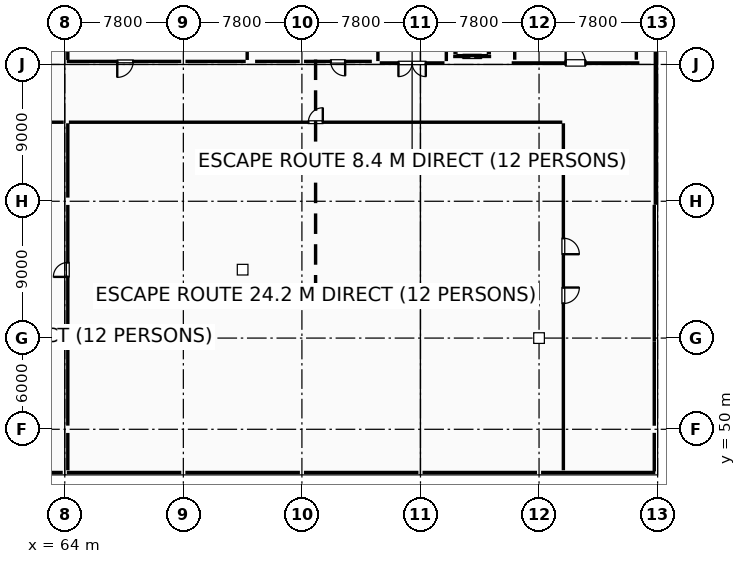
"""IFC4 building model, lengths in metres.
Left out: names, types, materials, properties, quantities, classifications, styles, units other than length and angle.
Written with IfcOpenShell. Run it as: python <this file> out.ifc"""

import sys

from ifc_helpers import new_model, si_unit, direction, frame, frame_2d, origin, origin_2d, place, context, subcontext, project, spatial, rectangle, hollow_rectangle, i_section, extrude, element, fill, save


model = new_model("IFC4")
c1 = context("Model", 3, precision=1e-05, world=origin(), true_north=direction((0.0, 1.0)))
c2 = subcontext(c1, "Body", "Model", "MODEL_VIEW")
j1 = project(units=[si_unit("LENGTHUNIT", "METRE"), si_unit("PLANEANGLEUNIT", "RADIAN")], contexts=[c1])
p1 = place(None, origin())
s1 = spatial("IfcSite", under=j1, at=p1, CompositionType="ELEMENT")
p2 = place(p1, origin())
s2 = spatial("IfcBuilding", under=s1, at=p2, CompositionType="ELEMENT")
p3 = place(p2, frame((0.0, 0.0, 24.3)))
s3 = spatial("IfcBuildingStorey", under=s2, at=p3, CompositionType="ELEMENT", Elevation=24.3)
p4 = place(p3, frame((64.0, 50.0, 0.0), z_axis=(0.0, 0.0, 1.0), x_axis=(1.0, 0.0, 0.0)))
e1 = element("IfcColumn", 1, at=p4, inside=s3, PredefinedType="COLUMN", context=c2, shape_type="SweptSolid", body=[
    extrude(hollow_rectangle(XDim=0.45, YDim=0.45, WallThickness=0.02, at=origin_2d()), origin(), (0.0, 0.0, 1.0), 4.5),
])
for number, where, z_axis, x_axis in (
    (2, (64.0, 56.0, 0.0), (0.0, 0.0, 1.0), (1.0, 0.0, 0.0)),
    (3, (64.0, 65.0, 0.0), (0.0, 0.0, 1.0), (1.0, 0.0, 0.0)),
    (4, (64.0, 74.0, 0.0), (0.0, 0.0, 1.0), (1.0, 0.0, 0.0)),
    (5, (71.8, 74.0, 0.0), (0.0, 0.0, 1.0), (1.0, 0.0, 0.0)),
    (6, (79.6, 74.0, 0.0), (0.0, 0.0, 1.0), (1.0, 0.0, 0.0)),
):
    element("IfcColumn", number, at=place(p3, frame(where, z_axis=z_axis, x_axis=x_axis)), inside=s3, PredefinedType="COLUMN", context=c2, shape_type="SweptSolid", body=[
        extrude(i_section(OverallWidth=0.25, OverallDepth=0.45, WebThickness=0.011, FlangeThickness=0.014, FilletRadius=0.015, at=origin_2d()), origin(), (0.0, 0.0, 1.0), 4.5),
    ])
p5 = place(p3, frame((103.0, 50.0, 0.0), z_axis=(0.0, 0.0, 1.0), x_axis=(1.0, 0.0, 0.0)))
e7 = element("IfcColumn", 7, at=p5, inside=s3, PredefinedType="COLUMN", context=c2, shape_type="SweptSolid", body=[
    extrude(hollow_rectangle(XDim=0.45, YDim=0.45, WallThickness=0.02, at=origin_2d()), origin(), (0.0, 0.0, 1.0), 4.5),
])
for number, where, z_axis, x_axis in (
    (8, (103.0, 56.0, 0.0), (0.0, 0.0, 1.0), (1.0, 0.0, 0.0)),
    (9, (103.0, 65.0, 0.0), (0.0, 0.0, 1.0), (1.0, 0.0, 0.0)),
    (10, (103.0, 74.0, 0.0), (0.0, 0.0, 1.0), (1.0, 0.0, 0.0)),
    (11, (64.0, 47.0, 0.0), (0.0, 0.0, 1.0), (1.0, 0.0, 0.0)),
    (12, (71.8, 47.0, 0.0), (0.0, 0.0, 1.0), (1.0, 0.0, 0.0)),
    (13, (79.6, 47.0, 0.0), (0.0, 0.0, 1.0), (1.0, 0.0, 0.0)),
    (14, (87.4, 47.0, 0.0), (0.0, 0.0, 1.0), (1.0, 0.0, 0.0)),
    (15, (95.2, 47.0, 0.0), (0.0, 0.0, 1.0), (1.0, 0.0, 0.0)),
    (16, (103.0, 47.0, 0.0), (0.0, 0.0, 1.0), (1.0, 0.0, 0.0)),
):
    element("IfcColumn", number, at=place(p3, frame(where, z_axis=z_axis, x_axis=x_axis)), inside=s3, PredefinedType="COLUMN", context=c2, shape_type="SweptSolid", body=[
        extrude(i_section(OverallWidth=0.25, OverallDepth=0.45, WebThickness=0.011, FlangeThickness=0.014, FilletRadius=0.015, at=origin_2d()), origin(), (0.0, 0.0, 1.0), 4.5),
    ])
for number, where, z_axis, x_axis in (
    (17, (102.85, 82.767, 0.0), (0.0, 0.0, 1.0), (0.0, -1.0, 0.0)),
    (18, (102.85, 73.767, 0.0), (0.0, 0.0, 1.0), (0.0, -1.0, 0.0)),
):
    element("IfcWall", number, at=place(p3, frame(where, z_axis=z_axis, x_axis=x_axis)), inside=s3, PredefinedType="ELEMENTEDWALL", context=c2, shape_type="SweptSolid", body=[
        extrude(rectangle(XDim=9.0, YDim=0.26, at=frame_2d((4.5, 0.0))), origin(), (0.0, 0.0, 1.0), 4.5),
    ])
p6 = place(p3, frame((102.78, 64.767, 0.0), z_axis=(0.0, 0.0, 1.0), x_axis=(0.0, -1.0, 0.0)))
e19 = element("IfcWall", 19, at=p6, inside=s3, PredefinedType="STANDARD", context=c2, shape_type="SweptSolid", body=[
    extrude(rectangle(XDim=9.0, YDim=0.4, at=frame_2d((4.5, 0.0))), origin(), (0.0, 0.0, 1.0), 4.5),
])
p7 = place(p3, frame((102.78, 55.767, 0.0), z_axis=(0.0, 0.0, 1.0), x_axis=(0.0, -1.0, 0.0)))
e20 = element("IfcWall", 20, at=p7, inside=s3, PredefinedType="STANDARD", context=c2, shape_type="SweptSolid", body=[
    extrude(rectangle(XDim=5.534, YDim=0.4, at=frame_2d((2.767, 0.0))), origin(), (0.0, 0.0, 1.0), 4.5),
])
p8 = place(p3, frame((102.78, 49.767, 0.0), z_axis=(0.0, 0.0, 1.0), x_axis=(0.0, -1.0, 0.0)))
e21 = element("IfcWall", 21, at=p8, inside=s3, PredefinedType="STANDARD", context=c2, shape_type="SweptSolid", body=[
    extrude(rectangle(XDim=2.534, YDim=0.4, at=frame_2d((1.267, 0.0))), origin(), (0.0, 0.0, 1.0), 4.5),
])
p9 = place(p3, frame((102.85, 47.16, 0.0), z_axis=(0.0, 0.0, 1.0), x_axis=(-1.0, 0.0, 0.0)))
e22 = element("IfcWall", 22, at=p9, inside=s3, PredefinedType="STANDARD", context=c2, shape_type="SweptSolid", body=[
    extrude(rectangle(XDim=7.517, YDim=0.28, at=frame_2d((3.759, 0.0))), origin(), (0.0, 0.0, 1.0), 1.893),
])
p10 = place(p3, frame((95.067, 47.16, 0.0), z_axis=(0.0, 0.0, 1.0), x_axis=(-1.0, 0.0, 0.0)))
e23 = element("IfcWall", 23, at=p10, inside=s3, PredefinedType="STANDARD", context=c2, shape_type="SweptSolid", body=[
    extrude(rectangle(XDim=7.534, YDim=0.28, at=frame_2d((3.767, 0.0))), origin(), (0.0, 0.0, 1.0), 3.088),
])
p11 = place(p3, frame((87.267, 47.16, 0.0), z_axis=(0.0, 0.0, 1.0), x_axis=(-1.0, 0.0, 0.0)))
e24 = element("IfcWall", 24, at=p11, inside=s3, PredefinedType="STANDARD", context=c2, shape_type="SweptSolid", body=[
    extrude(rectangle(XDim=7.534, YDim=0.28, at=frame_2d((3.767, 0.0))), origin(), (0.0, 0.0, 1.0), 1.893),
])
for number, where, z_axis, x_axis in (
    (25, (79.467, 47.16, 0.0), (0.0, 0.0, 1.0), (-1.0, 0.0, 0.0)),
    (26, (71.667, 47.16, 0.0), (0.0, 0.0, 1.0), (-1.0, 0.0, 0.0)),
):
    element("IfcWall", number, at=place(p3, frame(where, z_axis=z_axis, x_axis=x_axis)), inside=s3, PredefinedType="STANDARD", context=c2, shape_type="SweptSolid", body=[
        extrude(rectangle(XDim=7.534, YDim=0.28, at=frame_2d((3.767, 0.0))), origin(), (0.0, 0.0, 1.0), 1.25),
    ])
p12 = place(p3, frame((63.867, 47.16, 0.0), z_axis=(0.0, 0.0, 1.0), x_axis=(-1.0, 0.0, 0.0)))
e27 = element("IfcWall", 27, at=p12, inside=s3, PredefinedType="STANDARD", context=c2, shape_type="SweptSolid", body=[
    extrude(rectangle(XDim=9.717, YDim=0.28, at=frame_2d((4.858, 0.0))), origin(), (0.0, 0.0, 1.0), 4.28),
])
p13 = place(p3, frame((93.4, 74.1, 0.0), z_axis=(0.0, 0.0, 1.0), x_axis=(1.0, 0.0, 0.0)))
e28 = element("IfcWall", 28, at=p13, inside=s3, PredefinedType="SHEAR", context=c2, shape_type="SweptSolid", body=[
    extrude(rectangle(XDim=8.4, YDim=0.4, at=frame_2d((4.2, 0.0))), origin(), (0.0, 0.0, 1.0), 4.28),
])
p14 = place(p13, frame((3.55, 0.0, 0.0)))
e29 = element("IfcOpeningElement", 29, at=p14, cuts=e28, PredefinedType="OPENING", context=c2, shape_type="SweptSolid", body=[
    extrude(rectangle(XDim=1.3, YDim=2.15, at=frame_2d((0.65, 1.075))), frame((0.0, 0.21, 0.0), z_axis=(0.0, -1.0, 0.0), x_axis=(1.0, 0.0, 0.0)), (0.0, 0.0, 1.0), 0.42),
])
for number, where, z_axis, x_axis in (
    (30, (101.6, 74.31, 0.0), (0.0, 0.0, 1.0), (0.0, 1.0, 0.0)),
    (31, (93.6, 82.69, 0.0), (0.0, 0.0, 1.0), (0.0, -1.0, 0.0)),
):
    element("IfcWall", number, at=place(p3, frame(where, z_axis=z_axis, x_axis=x_axis)), inside=s3, PredefinedType="SHEAR", context=c2, shape_type="SweptSolid", body=[
        extrude(rectangle(XDim=8.38, YDim=0.4, at=frame_2d((4.19, 0.0))), origin(), (0.0, 0.0, 1.0), 4.28),
    ])
p15 = place(p3, frame((89.55, 74.525, 0.0), z_axis=(0.0, 0.0, 1.0), x_axis=(1.0, 0.0, 0.0)))
e32 = element("IfcWall", 32, at=p15, inside=s3, PredefinedType="STANDARD", context=c2, shape_type="SweptSolid", body=[
    extrude(rectangle(XDim=2.5, YDim=0.25, at=frame_2d((1.25, 0.0))), origin(), (0.0, 0.0, 1.0), 4.27),
])
p16 = place(p15, frame((0.65, 0.0, 0.0)))
e33 = element("IfcOpeningElement", 33, at=p16, cuts=e32, PredefinedType="OPENING", context=c2, shape_type="SweptSolid", body=[
    extrude(rectangle(XDim=1.2, YDim=2.05, at=frame_2d((0.6, 1.025))), frame((0.0, 0.135, 0.0), z_axis=(0.0, -1.0, 0.0), x_axis=(1.0, 0.0, 0.0)), (0.0, 0.0, 1.0), 0.27),
])
for number, where, z_axis, x_axis in (
    (34, (91.925, 74.66, 0.0), (0.0, 0.0, 1.0), (0.0, 1.0, 0.0)),
    (35, (89.675, 76.94, 0.0), (0.0, 0.0, 1.0), (0.0, -1.0, 0.0)),
):
    element("IfcWall", number, at=place(p3, frame(where, z_axis=z_axis, x_axis=x_axis)), inside=s3, PredefinedType="STANDARD", context=c2, shape_type="SweptSolid", body=[
        extrude(rectangle(XDim=2.28, YDim=0.25, at=frame_2d((1.14, 0.0))), origin(), (0.0, 0.0, 1.0), 4.27),
    ])
for number, where, z_axis, x_axis in (
    (36, (84.6, 74.22, 0.0), (0.0, 0.0, 1.0), (0.0, 1.0, 0.0)),
    (37, (89.1, 77.58, 0.0), (0.0, 0.0, 1.0), (0.0, -1.0, 0.0)),
):
    element("IfcWall", number, at=place(p3, frame(where, z_axis=z_axis, x_axis=x_axis)), inside=s3, PredefinedType="PARTITIONING", context=c2, shape_type="SweptSolid", body=[
        extrude(rectangle(XDim=3.36, YDim=0.2, at=frame_2d((1.68, 0.0))), origin(), (0.0, 0.0, 1.0), 4.5),
    ])
p17 = place(p3, frame((88.98, 74.1, 0.0), z_axis=(0.0, 0.0, 1.0), x_axis=(-1.0, 0.0, 0.0)))
e38 = element("IfcWall", 38, at=p17, inside=s3, PredefinedType="PARTITIONING", context=c2, shape_type="SweptSolid", body=[
    extrude(rectangle(XDim=4.26, YDim=0.2, at=frame_2d((2.13, 0.0))), origin(), (0.0, 0.0, 1.0), 4.5),
])
p18 = place(p17, frame((1.23, 0.0, 0.0)))
e39 = element("IfcOpeningElement", 39, at=p18, cuts=e38, PredefinedType="OPENING", context=c2, shape_type="SweptSolid", body=[
    extrude(rectangle(XDim=1.8, YDim=2.15, at=frame_2d((0.9, 1.075))), frame((0.0, 0.11, 0.0), z_axis=(0.0, -1.0, 0.0), x_axis=(1.0, 0.0, 0.0)), (0.0, 0.0, 1.0), 0.22),
])
p19 = place(p3, frame((64.27, 70.2, 0.0), z_axis=(0.0, 0.0, 1.0), x_axis=(1.0, 0.0, 0.0)))
e40 = element("IfcWall", 40, at=p19, inside=s3, PredefinedType="PARTITIONING", context=c2, shape_type="SweptSolid", body=[
    extrude(rectangle(XDim=32.46, YDim=0.1, at=frame_2d((16.23, 0.0))), origin(), (0.0, 0.0, 1.0), 4.5),
])
p20 = place(p19, frame((15.755, 0.0, 0.0)))
e41 = element("IfcOpeningElement", 41, at=p20, cuts=e40, PredefinedType="OPENING", context=c2, shape_type="SweptSolid", body=[
    extrude(rectangle(XDim=0.95, YDim=2.15, at=frame_2d((0.475, 1.075))), frame((0.0, 0.06, 0.0), z_axis=(0.0, -1.0, 0.0), x_axis=(1.0, 0.0, 0.0)), (0.0, 0.0, 1.0), 0.12),
])
p21 = place(p3, frame((96.8, 70.13, 0.0), z_axis=(0.0, 0.0, 1.0), x_axis=(0.0, -1.0, 0.0)))
e42 = element("IfcWall", 42, at=p21, inside=s3, PredefinedType="PARTITIONING", context=c2, shape_type="SweptSolid", body=[
    extrude(rectangle(XDim=22.826, YDim=0.1, at=frame_2d((11.413, 0.0))), origin(), (0.0, 0.0, 1.0), 4.5),
])
p22 = place(p21, frame((10.805, 0.0, 0.0)))
e43 = element("IfcOpeningElement", 43, at=p22, cuts=e42, PredefinedType="OPENING", context=c2, shape_type="SweptSolid", body=[
    extrude(rectangle(XDim=1.05, YDim=2.15, at=frame_2d((0.525, 1.075))), frame((0.0, 0.06, 0.0), z_axis=(0.0, -1.0, 0.0), x_axis=(1.0, 0.0, 0.0)), (0.0, 0.0, 1.0), 0.12),
])
p23 = place(p21, frame((7.563, 0.0, 0.0)))
e44 = element("IfcOpeningElement", 44, at=p23, cuts=e42, PredefinedType="OPENING", context=c2, shape_type="SweptSolid", body=[
    extrude(rectangle(XDim=1.05, YDim=2.15, at=frame_2d((0.525, 1.075))), frame((0.0, 0.06, 0.0), z_axis=(0.0, -1.0, 0.0), x_axis=(1.0, 0.0, 0.0)), (0.0, 0.0, 1.0), 0.12),
])
p24 = place(p3, frame((64.2, 47.304, 0.0), z_axis=(0.0, 0.0, 1.0), x_axis=(0.0, 1.0, 0.0)))
e45 = element("IfcWall", 45, at=p24, inside=s3, PredefinedType="PARTITIONING", context=c2, shape_type="SweptSolid", body=[
    extrude(rectangle(XDim=2.456, YDim=0.1, at=frame_2d((1.228, 0.0))), origin(), (0.0, 0.0, 1.0), 3.51),
])
p25 = place(p3, frame((64.2, 50.24, 0.0), z_axis=(0.0, 0.0, 1.0), x_axis=(0.0, 1.0, 0.0)))
e46 = element("IfcWall", 46, at=p25, inside=s3, PredefinedType="PARTITIONING", context=c2, shape_type="SweptSolid", body=[
    extrude(rectangle(XDim=5.52, YDim=0.1, at=frame_2d((2.76, 0.0))), origin(), (0.0, 0.0, 1.0), 3.61),
])
p26 = place(p3, frame((64.2, 56.24, 0.0), z_axis=(0.0, 0.0, 1.0), x_axis=(0.0, 1.0, 0.0)))
e47 = element("IfcWall", 47, at=p26, inside=s3, PredefinedType="PARTITIONING", context=c2, shape_type="SweptSolid", body=[
    extrude(rectangle(XDim=8.52, YDim=0.1, at=frame_2d((4.26, 0.0))), origin(), (0.0, 0.0, 1.0), 3.81),
])
p27 = place(p26, frame((3.785, 0.0, 0.0)))
e48 = element("IfcOpeningElement", 48, at=p27, cuts=e47, PredefinedType="OPENING", context=c2, shape_type="SweptSolid", body=[
    extrude(rectangle(XDim=0.95, YDim=2.15, at=frame_2d((0.475, 1.075))), frame((0.0, 0.06, 0.0), z_axis=(0.0, -1.0, 0.0), x_axis=(1.0, 0.0, 0.0)), (0.0, 0.0, 1.0), 0.12),
])
p28 = place(p3, frame((64.2, 65.24, 0.0), z_axis=(0.0, 0.0, 1.0), x_axis=(0.0, 1.0, 0.0)))
e49 = element("IfcWall", 49, at=p28, inside=s3, PredefinedType="PARTITIONING", context=c2, shape_type="SweptSolid", body=[
    extrude(rectangle(XDim=4.89, YDim=0.1, at=frame_2d((2.445, 0.0))), origin(), (0.0, 0.0, 1.0), 3.66),
])
p29 = place(p3, frame((54.47, 70.2, 0.0), z_axis=(0.0, 0.0, 1.0), x_axis=(1.0, 0.0, 0.0)))
e50 = element("IfcWall", 50, at=p29, inside=s3, PredefinedType="PARTITIONING", context=c2, shape_type="SweptSolid", body=[
    extrude(rectangle(XDim=9.46, YDim=0.1, at=frame_2d((4.73, 0.0))), origin(), (0.0, 0.0, 1.0), 4.27),
])
p30 = place(p29, frame((4.205, 0.0, 0.0)))
e51 = element("IfcOpeningElement", 51, at=p30, cuts=e50, PredefinedType="OPENING", context=c2, shape_type="SweptSolid", body=[
    extrude(rectangle(XDim=1.05, YDim=2.15, at=frame_2d((0.525, 1.075))), frame((0.0, 0.06, 0.0), z_axis=(0.0, -1.0, 0.0), x_axis=(1.0, 0.0, 0.0)), (0.0, 0.0, 1.0), 0.12),
])
p31 = place(p3, frame((76.0, 82.576, 0.0), z_axis=(0.0, 0.0, 1.0), x_axis=(0.0, -1.0, 0.0)))
e52 = element("IfcWall", 52, at=p31, inside=s3, PredefinedType="PARTITIONING", context=c2, shape_type="SweptSolid", body=[
    extrude(rectangle(XDim=8.281, YDim=0.15, at=frame_2d((4.141, 0.0))), origin(), (0.0, 0.0, 1.0), 4.5),
])
p32 = place(p3, frame((75.905, 74.2, 0.0), z_axis=(0.0, 0.0, 1.0), x_axis=(-1.0, 0.0, 0.0)))
e53 = element("IfcWall", 53, at=p32, inside=s3, PredefinedType="PARTITIONING", context=c2, shape_type="SweptSolid", body=[
    extrude(rectangle(XDim=3.965, YDim=0.15, at=frame_2d((1.982, 0.0))), origin(), (0.0, 0.0, 1.0), 4.5),
])
p33 = place(p3, frame((71.66, 74.2, 0.0), z_axis=(0.0, 0.0, 1.0), x_axis=(-1.0, 0.0, 0.0)))
e54 = element("IfcWall", 54, at=p33, inside=s3, PredefinedType="PARTITIONING", context=c2, shape_type="SweptSolid", body=[
    extrude(rectangle(XDim=7.531, YDim=0.15, at=frame_2d((3.766, 0.0))), origin(), (0.0, 0.0, 1.0), 4.27),
])
p34 = place(p33, frame((3.157, 0.0, 0.0)))
e55 = element("IfcOpeningElement", 55, at=p34, cuts=e54, PredefinedType="OPENING", context=c2, shape_type="SweptSolid", body=[
    extrude(rectangle(XDim=1.05, YDim=2.15, at=frame_2d((0.525, 1.075))), frame((0.0, 0.085, 0.0), z_axis=(0.0, -1.0, 0.0), x_axis=(1.0, 0.0, 0.0)), (0.0, 0.0, 1.0), 0.17),
])
p35 = place(p3, frame((64.2, 74.295, 0.0), z_axis=(0.0, 0.0, 1.0), x_axis=(0.0, 1.0, 0.0)))
e56 = element("IfcWall", 56, at=p35, inside=s3, PredefinedType="PARTITIONING", context=c2, shape_type="SweptSolid", body=[
    extrude(rectangle(XDim=8.476, YDim=0.15, at=frame_2d((4.238, 0.0))), origin(), (0.0, 0.0, 1.0), 3.71),
])
p36 = place(p3, frame((84.2, 74.2, 0.0), z_axis=(0.0, 0.0, 1.0), x_axis=(-1.0, 0.0, 0.0)))
e57 = element("IfcWall", 57, at=p36, inside=s3, PredefinedType="PARTITIONING", context=c2, shape_type="SweptSolid", body=[
    extrude(rectangle(XDim=4.46, YDim=0.2, at=frame_2d((2.23, 0.0))), origin(), (0.0, 0.0, 1.0), 4.5),
])
p37 = place(p36, frame((1.755, 0.0, 0.0)))
e58 = element("IfcOpeningElement", 58, at=p37, cuts=e57, PredefinedType="OPENING", context=c2, shape_type="SweptSolid", body=[
    extrude(rectangle(XDim=0.95, YDim=2.15, at=frame_2d((0.475, 1.075))), frame((0.0, 0.11, 0.0), z_axis=(0.0, -1.0, 0.0), x_axis=(1.0, 0.0, 0.0)), (0.0, 0.0, 1.0), 0.22),
])
p38 = place(p3, frame((79.46, 74.2, 0.0), z_axis=(0.0, 0.0, 1.0), x_axis=(-1.0, 0.0, 0.0)))
e59 = element("IfcWall", 59, at=p38, inside=s3, PredefinedType="PARTITIONING", context=c2, shape_type="SweptSolid", body=[
    extrude(rectangle(XDim=2.94, YDim=0.2, at=frame_2d((1.47, 0.0))), origin(), (0.0, 0.0, 1.0), 4.5),
])
p39 = place(p14, origin())
e60 = element("IfcDoor", 60, at=p39, inside=s3, OperationType="SINGLE_SWING_LEFT", PredefinedType="DOOR", context=c2, shape_type="SweptSolid", body=[
    extrude(rectangle(XDim=1.3, YDim=2.15, at=frame_2d((0.65, 1.075))), frame((0.0, 0.025, 0.0), z_axis=(0.0, -1.0, 0.0), x_axis=(1.0, 0.0, 0.0)), (0.0, 0.0, 1.0), 0.05),
])
fill(e29, e60)
p40 = place(p16, origin())
e61 = element("IfcDoor", 61, at=p40, inside=s3, OperationType="DOUBLE_DOOR_SLIDING", PredefinedType="DOOR", context=c2, shape_type="SweptSolid", body=[
    extrude(rectangle(XDim=1.2, YDim=2.05, at=frame_2d((0.6, 1.025))), frame((0.0, 0.025, 0.0), z_axis=(0.0, -1.0, 0.0), x_axis=(1.0, 0.0, 0.0)), (0.0, 0.0, 1.0), 0.05),
])
fill(e33, e61)
p41 = place(p18, origin())
e62 = element("IfcDoor", 62, at=p41, inside=s3, OperationType="DOUBLE_DOOR_SINGLE_SWING", PredefinedType="DOOR", context=c2, shape_type="SweptSolid", body=[
    extrude(rectangle(XDim=1.8, YDim=2.15, at=frame_2d((0.9, 1.075))), frame((0.0, 0.025, 0.0), z_axis=(0.0, -1.0, 0.0), x_axis=(1.0, 0.0, 0.0)), (0.0, 0.0, 1.0), 0.05),
])
fill(e39, e62)
p42 = place(p20, origin())
e63 = element("IfcDoor", 63, at=p42, inside=s3, OperationType="SINGLE_SWING_RIGHT", PredefinedType="DOOR", context=c2, shape_type="SweptSolid", body=[
    extrude(rectangle(XDim=0.95, YDim=2.15, at=frame_2d((0.475, 1.075))), frame((0.0, 0.025, 0.0), z_axis=(0.0, -1.0, 0.0), x_axis=(1.0, 0.0, 0.0)), (0.0, 0.0, 1.0), 0.05),
])
fill(e41, e63)
p43 = place(p22, origin())
e64 = element("IfcDoor", 64, at=p43, inside=s3, OperationType="SINGLE_SWING_LEFT", PredefinedType="DOOR", context=c2, shape_type="SweptSolid", body=[
    extrude(rectangle(XDim=1.05, YDim=2.15, at=frame_2d((0.525, 1.075))), frame((0.0, 0.025, 0.0), z_axis=(0.0, -1.0, 0.0), x_axis=(1.0, 0.0, 0.0)), (0.0, 0.0, 1.0), 0.05),
])
fill(e43, e64)
p44 = place(p27, origin())
e65 = element("IfcDoor", 65, at=p44, inside=s3, OperationType="SINGLE_SWING_LEFT", PredefinedType="DOOR", context=c2, shape_type="SweptSolid", body=[
    extrude(rectangle(XDim=0.95, YDim=2.15, at=frame_2d((0.475, 1.075))), frame((0.0, 0.025, 0.0), z_axis=(0.0, -1.0, 0.0), x_axis=(1.0, 0.0, 0.0)), (0.0, 0.0, 1.0), 0.05),
])
fill(e48, e65)
p45 = place(p34, origin())
e66 = element("IfcDoor", 66, at=p45, inside=s3, OperationType="SINGLE_SWING_RIGHT", PredefinedType="DOOR", context=c2, shape_type="SweptSolid", body=[
    extrude(rectangle(XDim=1.05, YDim=2.15, at=frame_2d((0.525, 1.075))), frame((0.0, 0.025, 0.0), z_axis=(0.0, -1.0, 0.0), x_axis=(1.0, 0.0, 0.0)), (0.0, 0.0, 1.0), 0.05),
])
fill(e55, e66)
p46 = place(p37, origin())
e67 = element("IfcDoor", 67, at=p46, inside=s3, OperationType="SINGLE_SWING_LEFT", PredefinedType="DOOR", context=c2, shape_type="SweptSolid", body=[
    extrude(rectangle(XDim=0.95, YDim=2.15, at=frame_2d((0.475, 1.075))), frame((0.0, 0.025, 0.0), z_axis=(0.0, -1.0, 0.0), x_axis=(1.0, 0.0, 0.0)), (0.0, 0.0, 1.0), 0.05),
])
fill(e58, e67)
p47 = place(p23, origin())
e68 = element("IfcDoor", 68, at=p47, inside=s3, OperationType="SINGLE_SWING_RIGHT", PredefinedType="DOOR", context=c2, shape_type="SweptSolid", body=[
    extrude(rectangle(XDim=1.05, YDim=2.15, at=frame_2d((0.525, 1.075))), frame((0.0, 0.025, 0.0), z_axis=(0.0, -1.0, 0.0), x_axis=(1.0, 0.0, 0.0)), (0.0, 0.0, 1.0), 0.05),
])
fill(e44, e68)
save(model, sys.argv[1])
